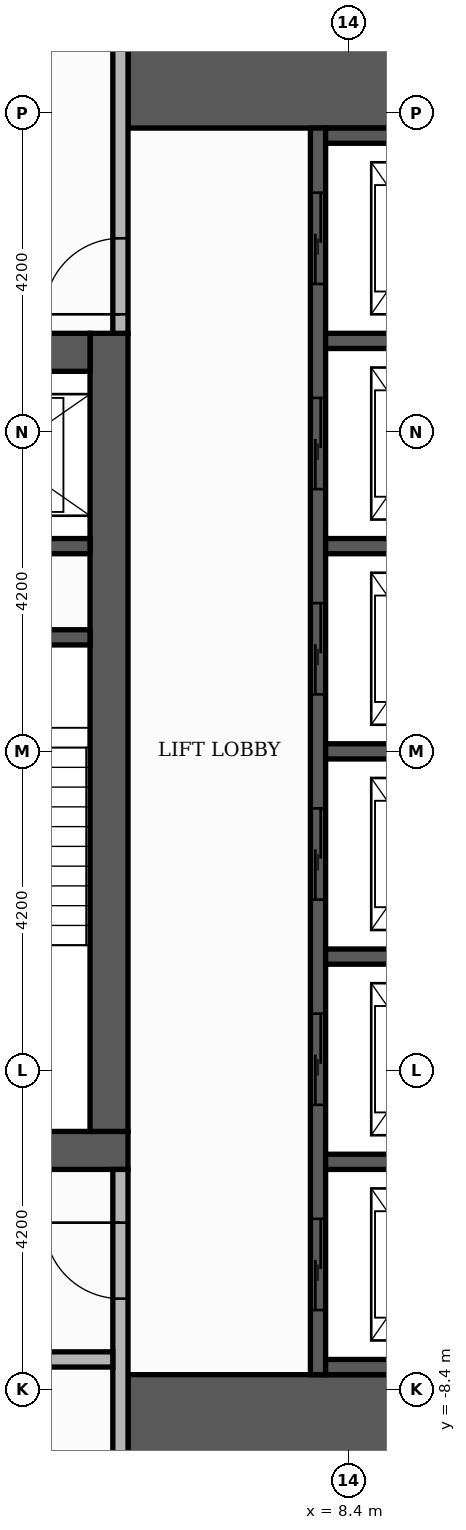
"""IFC4 building model, lengths in metres.
Left out: names, types, materials, properties, quantities, classifications, styles, units other than length and angle.
Written with IfcOpenShell. Run it as: python <this file> out.ifc"""

import sys

from ifc_helpers import new_model, si_unit, direction, frame, frame_2d, origin, place, context, subcontext, project, spatial, rectangle, extrude, element, fill, save


model = new_model("IFC4")
c1 = context("Model", 3, precision=1e-05, world=origin(), true_north=direction((0.0, 1.0)))
c2 = subcontext(c1, "Body", "Model", "MODEL_VIEW")
j1 = project(units=[si_unit("LENGTHUNIT", "METRE"), si_unit("PLANEANGLEUNIT", "RADIAN")], contexts=[c1])
p1 = place(None, origin())
s1 = spatial("IfcSite", under=j1, at=p1, CompositionType="ELEMENT")
p2 = place(p1, origin())
s2 = spatial("IfcBuilding", under=s1, at=p2, CompositionType="ELEMENT")
p3 = place(p2, frame((0.0, 0.0, 260.1)))
s3 = spatial("IfcBuildingStorey", under=s2, at=p3, CompositionType="ELEMENT", Elevation=260.1)
p4 = place(p3, frame((-5.5, -5.25, 0.0), z_axis=(0.0, 0.0, 1.0), x_axis=(1.0, 0.0, 0.0)))
e1 = element("IfcWall", 1, at=p4, inside=s3, PredefinedType="SHEAR", context=c2, shape_type="SweptSolid", body=[
    extrude(rectangle(XDim=11.0, YDim=0.5, at=frame_2d((5.5, 0.0))), origin(), (0.0, 0.0, 1.0), 3.48),
])
p5 = place(p4, frame((4.9, 0.0, 0.0)))
e2 = element("IfcOpeningElement", 2, at=p5, cuts=e1, PredefinedType="OPENING", context=c2, shape_type="SweptSolid", body=[
    extrude(rectangle(XDim=1.2, YDim=2.1, at=frame_2d((0.6, 1.05))), frame((0.0, 0.26, 0.0), z_axis=(0.0, -1.0, 0.0), x_axis=(1.0, 0.0, 0.0)), (0.0, 0.0, 1.0), 0.52),
])
p6 = place(p3, frame((5.25, -5.0, 0.0), z_axis=(0.0, 0.0, 1.0), x_axis=(0.0, 1.0, 0.0)))
e3 = element("IfcWall", 3, at=p6, inside=s3, PredefinedType="SHEAR", context=c2, shape_type="SweptSolid", body=[
    extrude(rectangle(XDim=10.5, YDim=0.5, at=frame_2d((5.25, 0.0))), origin(), (0.0, 0.0, 1.0), 3.48),
])
p7 = place(p3, frame((-5.0, 5.25, 0.0), z_axis=(0.0, 0.0, 1.0), x_axis=(1.0, 0.0, 0.0)))
e4 = element("IfcWall", 4, at=p7, inside=s3, PredefinedType="SHEAR", context=c2, shape_type="SweptSolid", body=[
    extrude(rectangle(XDim=10.0, YDim=0.5, at=frame_2d((5.0, 0.0))), origin(), (0.0, 0.0, 1.0), 3.48),
])
p8 = place(p7, frame((4.4, 0.0, 0.0)))
e5 = element("IfcOpeningElement", 5, at=p8, cuts=e4, PredefinedType="OPENING", context=c2, shape_type="SweptSolid", body=[
    extrude(rectangle(XDim=1.2, YDim=2.1, at=frame_2d((0.6, 1.05))), frame((0.0, 0.26, 0.0), z_axis=(0.0, -1.0, 0.0), x_axis=(1.0, 0.0, 0.0)), (0.0, 0.0, 1.0), 0.52),
])
for number, where, z_axis, x_axis in (
    (6, (5.5, -9.15, 0.0), (0.0, 0.0, 1.0), (1.0, 0.0, 0.0)),
    (7, (5.5, 9.15, 0.0), (0.0, 0.0, 1.0), (1.0, 0.0, 0.0)),
):
    element("IfcWall", number, at=place(p3, frame(where, z_axis=z_axis, x_axis=x_axis)), inside=s3, PredefinedType="SHEAR", context=c2, shape_type="SweptSolid", body=[
        extrude(rectangle(XDim=4.6, YDim=1.9, at=frame_2d((2.3, 0.0))), origin(), (0.0, 0.0, 1.0), 3.48),
    ])
p9 = place(p3, frame((2.15, 1.5, 0.0), z_axis=(0.0, 0.0, 1.0), x_axis=(1.0, 0.0, 0.0)))
e8 = element("IfcWall", 8, at=p9, inside=s3, PredefinedType="SHEAR", context=c2, shape_type="SweptSolid", body=[
    extrude(rectangle(XDim=2.85, YDim=0.2, at=frame_2d((1.425, 0.0))), origin(), (0.0, 0.0, 1.0), 3.48),
])
p10 = place(p3, frame((8.0, -8.2, 0.0), z_axis=(0.0, 0.0, 1.0), x_axis=(0.0, 1.0, 0.0)))
e9 = element("IfcWall", 9, at=p10, inside=s3, PredefinedType="SHEAR", context=c2, shape_type="SweptSolid", body=[
    extrude(rectangle(XDim=16.4, YDim=0.2, at=frame_2d((8.2, 0.0))), origin(), (0.0, 0.0, 1.0), 3.48),
])
p11 = place(p10, frame((0.85, 0.0, 0.0)))
e10 = element("IfcOpeningElement", 10, at=p11, cuts=e9, PredefinedType="OPENING", context=c2, shape_type="SweptSolid", body=[
    extrude(rectangle(XDim=1.2, YDim=2.1, at=frame_2d((0.6, 1.05))), frame((0.0, 0.11, 0.0), z_axis=(0.0, -1.0, 0.0), x_axis=(1.0, 0.0, 0.0)), (0.0, 0.0, 1.0), 0.22),
])
p12 = place(p10, frame((3.55, 0.0, 0.0)))
e11 = element("IfcOpeningElement", 11, at=p12, cuts=e9, PredefinedType="OPENING", context=c2, shape_type="SweptSolid", body=[
    extrude(rectangle(XDim=1.2, YDim=2.1, at=frame_2d((0.6, 1.05))), frame((0.0, 0.11, 0.0), z_axis=(0.0, -1.0, 0.0), x_axis=(1.0, 0.0, 0.0)), (0.0, 0.0, 1.0), 0.22),
])
p13 = place(p10, frame((6.25, 0.0, 0.0)))
e12 = element("IfcOpeningElement", 12, at=p13, cuts=e9, PredefinedType="OPENING", context=c2, shape_type="SweptSolid", body=[
    extrude(rectangle(XDim=1.2, YDim=2.1, at=frame_2d((0.6, 1.05))), frame((0.0, 0.11, 0.0), z_axis=(0.0, -1.0, 0.0), x_axis=(1.0, 0.0, 0.0)), (0.0, 0.0, 1.0), 0.22),
])
p14 = place(p10, frame((8.95, 0.0, 0.0)))
e13 = element("IfcOpeningElement", 13, at=p14, cuts=e9, PredefinedType="OPENING", context=c2, shape_type="SweptSolid", body=[
    extrude(rectangle(XDim=1.2, YDim=2.1, at=frame_2d((0.6, 1.05))), frame((0.0, 0.11, 0.0), z_axis=(0.0, -1.0, 0.0), x_axis=(1.0, 0.0, 0.0)), (0.0, 0.0, 1.0), 0.22),
])
p15 = place(p10, frame((11.65, 0.0, 0.0)))
e14 = element("IfcOpeningElement", 14, at=p15, cuts=e9, PredefinedType="OPENING", context=c2, shape_type="SweptSolid", body=[
    extrude(rectangle(XDim=1.2, YDim=2.1, at=frame_2d((0.6, 1.05))), frame((0.0, 0.11, 0.0), z_axis=(0.0, -1.0, 0.0), x_axis=(1.0, 0.0, 0.0)), (0.0, 0.0, 1.0), 0.22),
])
p16 = place(p10, frame((14.35, 0.0, 0.0)))
e15 = element("IfcOpeningElement", 15, at=p16, cuts=e9, PredefinedType="OPENING", context=c2, shape_type="SweptSolid", body=[
    extrude(rectangle(XDim=1.2, YDim=2.1, at=frame_2d((0.6, 1.05))), frame((0.0, 0.11, 0.0), z_axis=(0.0, -1.0, 0.0), x_axis=(1.0, 0.0, 0.0)), (0.0, 0.0, 1.0), 0.22),
])
for number, where, z_axis, x_axis in (
    (16, (8.1, -8.1, 0.0), (0.0, 0.0, 1.0), (1.0, 0.0, 0.0)),
    (17, (8.1, -5.4, 0.0), (0.0, 0.0, 1.0), (1.0, 0.0, 0.0)),
    (18, (8.1, -2.7, 0.0), (0.0, 0.0, 1.0), (1.0, 0.0, 0.0)),
    (19, (8.1, 0.0, 0.0), (0.0, 0.0, 1.0), (1.0, 0.0, 0.0)),
):
    element("IfcWall", number, at=place(p3, frame(where, z_axis=z_axis, x_axis=x_axis)), inside=s3, PredefinedType="SHEAR", context=c2, shape_type="SweptSolid", body=[
        extrude(rectangle(XDim=2.0, YDim=0.2, at=frame_2d((1.0, 0.0))), origin(), (0.0, 0.0, 1.0), 3.48),
    ])
p17 = place(p3, frame((2.15, 2.7, 0.0), z_axis=(0.0, 0.0, 1.0), x_axis=(1.0, 0.0, 0.0)))
e20 = element("IfcWall", 20, at=p17, inside=s3, PredefinedType="SHEAR", context=c2, shape_type="SweptSolid", body=[
    extrude(rectangle(XDim=2.85, YDim=0.2, at=frame_2d((1.425, 0.0))), origin(), (0.0, 0.0, 1.0), 3.48),
])
for number, where, z_axis, x_axis in (
    (21, (8.1, 2.7, 0.0), (0.0, 0.0, 1.0), (1.0, 0.0, 0.0)),
    (22, (8.1, 5.4, 0.0), (0.0, 0.0, 1.0), (1.0, 0.0, 0.0)),
    (23, (8.1, 8.1, 0.0), (0.0, 0.0, 1.0), (1.0, 0.0, 0.0)),
):
    element("IfcWall", number, at=place(p3, frame(where, z_axis=z_axis, x_axis=x_axis)), inside=s3, PredefinedType="SHEAR", context=c2, shape_type="SweptSolid", body=[
        extrude(rectangle(XDim=2.0, YDim=0.2, at=frame_2d((1.0, 0.0))), origin(), (0.0, 0.0, 1.0), 3.48),
    ])
p18 = place(p3, frame((5.4, -10.1, 0.0), z_axis=(0.0, 0.0, 1.0), x_axis=(0.0, 1.0, 0.0)))
e24 = element("IfcWall", 24, at=p18, inside=s3, PredefinedType="PARTITIONING", context=c2, shape_type="SweptSolid", body=[
    extrude(rectangle(XDim=4.6, YDim=0.2, at=frame_2d((2.3, 0.0))), origin(), (0.0, 0.0, 1.0), 3.48),
])
p19 = place(p18, frame((2.9, 0.0, 0.0)))
e25 = element("IfcOpeningElement", 25, at=p19, cuts=e24, PredefinedType="OPENING", context=c2, shape_type="SweptSolid", body=[
    extrude(rectangle(XDim=1.0, YDim=2.1, at=frame_2d((0.5, 1.05))), frame((0.0, 0.11, 0.0), z_axis=(0.0, -1.0, 0.0), x_axis=(1.0, 0.0, 0.0)), (0.0, 0.0, 1.0), 0.22),
])
p20 = place(p3, frame((2.35, -8.0, 0.0), z_axis=(0.0, 0.0, 1.0), x_axis=(1.0, 0.0, 0.0)))
e26 = element("IfcWall", 26, at=p20, inside=s3, PredefinedType="PARTITIONING", context=c2, shape_type="SweptSolid", body=[
    extrude(rectangle(XDim=2.95, YDim=0.2, at=frame_2d((1.475, 0.0))), origin(), (0.0, 0.0, 1.0), 3.48),
])
p21 = place(p20, frame((1.0, 0.0, 0.0)))
e27 = element("IfcOpeningElement", 27, at=p21, cuts=e26, PredefinedType="OPENING", context=c2, shape_type="SweptSolid", body=[
    extrude(rectangle(XDim=0.9, YDim=2.1, at=frame_2d((0.45, 1.05))), frame((0.0, 0.11, 0.0), z_axis=(0.0, -1.0, 0.0), x_axis=(1.0, 0.0, 0.0)), (0.0, 0.0, 1.0), 0.22),
])
p22 = place(p3, frame((5.4, 5.5, 0.0), z_axis=(0.0, 0.0, 1.0), x_axis=(0.0, 1.0, 0.0)))
e28 = element("IfcWall", 28, at=p22, inside=s3, PredefinedType="PARTITIONING", context=c2, shape_type="SweptSolid", body=[
    extrude(rectangle(XDim=4.6, YDim=0.2, at=frame_2d((2.3, 0.0))), origin(), (0.0, 0.0, 1.0), 3.48),
])
p23 = place(p22, frame((0.25, 0.0, 0.0)))
e29 = element("IfcOpeningElement", 29, at=p23, cuts=e28, PredefinedType="OPENING", context=c2, shape_type="SweptSolid", body=[
    extrude(rectangle(XDim=1.0, YDim=2.1, at=frame_2d((0.5, 1.05))), frame((0.0, 0.11, 0.0), z_axis=(0.0, -1.0, 0.0), x_axis=(1.0, 0.0, 0.0)), (0.0, 0.0, 1.0), 0.22),
])
p24 = place(p11, origin())
e30 = element("IfcDoor", 30, at=p24, inside=s3, OperationType="SLIDING_TO_LEFT", PredefinedType="DOOR", context=c2, shape_type="SweptSolid", body=[
    extrude(rectangle(XDim=1.2, YDim=2.1, at=frame_2d((0.6, 1.05))), frame((0.0, 0.025, 0.0), z_axis=(0.0, -1.0, 0.0), x_axis=(1.0, 0.0, 0.0)), (0.0, 0.0, 1.0), 0.05),
])
fill(e10, e30)
p25 = place(p12, origin())
e31 = element("IfcDoor", 31, at=p25, inside=s3, OperationType="SLIDING_TO_LEFT", PredefinedType="DOOR", context=c2, shape_type="SweptSolid", body=[
    extrude(rectangle(XDim=1.2, YDim=2.1, at=frame_2d((0.6, 1.05))), frame((0.0, 0.025, 0.0), z_axis=(0.0, -1.0, 0.0), x_axis=(1.0, 0.0, 0.0)), (0.0, 0.0, 1.0), 0.05),
])
fill(e11, e31)
p26 = place(p13, origin())
e32 = element("IfcDoor", 32, at=p26, inside=s3, OperationType="SLIDING_TO_LEFT", PredefinedType="DOOR", context=c2, shape_type="SweptSolid", body=[
    extrude(rectangle(XDim=1.2, YDim=2.1, at=frame_2d((0.6, 1.05))), frame((0.0, 0.025, 0.0), z_axis=(0.0, -1.0, 0.0), x_axis=(1.0, 0.0, 0.0)), (0.0, 0.0, 1.0), 0.05),
])
fill(e12, e32)
p27 = place(p14, origin())
e33 = element("IfcDoor", 33, at=p27, inside=s3, OperationType="SLIDING_TO_LEFT", PredefinedType="DOOR", context=c2, shape_type="SweptSolid", body=[
    extrude(rectangle(XDim=1.2, YDim=2.1, at=frame_2d((0.6, 1.05))), frame((0.0, 0.025, 0.0), z_axis=(0.0, -1.0, 0.0), x_axis=(1.0, 0.0, 0.0)), (0.0, 0.0, 1.0), 0.05),
])
fill(e13, e33)
p28 = place(p15, origin())
e34 = element("IfcDoor", 34, at=p28, inside=s3, OperationType="SLIDING_TO_LEFT", PredefinedType="DOOR", context=c2, shape_type="SweptSolid", body=[
    extrude(rectangle(XDim=1.2, YDim=2.1, at=frame_2d((0.6, 1.05))), frame((0.0, 0.025, 0.0), z_axis=(0.0, -1.0, 0.0), x_axis=(1.0, 0.0, 0.0)), (0.0, 0.0, 1.0), 0.05),
])
fill(e14, e34)
p29 = place(p16, origin())
e35 = element("IfcDoor", 35, at=p29, inside=s3, OperationType="SLIDING_TO_LEFT", PredefinedType="DOOR", context=c2, shape_type="SweptSolid", body=[
    extrude(rectangle(XDim=1.2, YDim=2.1, at=frame_2d((0.6, 1.05))), frame((0.0, 0.025, 0.0), z_axis=(0.0, -1.0, 0.0), x_axis=(1.0, 0.0, 0.0)), (0.0, 0.0, 1.0), 0.05),
])
fill(e15, e35)
p30 = place(p23, origin())
e36 = element("IfcDoor", 36, at=p30, inside=s3, OperationType="SINGLE_SWING_LEFT", PredefinedType="DOOR", context=c2, shape_type="SweptSolid", body=[
    extrude(rectangle(XDim=1.0, YDim=2.1, at=frame_2d((0.5, 1.05))), frame((0.0, 0.025, 0.0), z_axis=(0.0, -1.0, 0.0), x_axis=(1.0, 0.0, 0.0)), (0.0, 0.0, 1.0), 0.05),
])
fill(e29, e36)
p31 = place(p19, origin())
e37 = element("IfcDoor", 37, at=p31, inside=s3, OperationType="SINGLE_SWING_RIGHT", PredefinedType="DOOR", context=c2, shape_type="SweptSolid", body=[
    extrude(rectangle(XDim=1.0, YDim=2.1, at=frame_2d((0.5, 1.05))), frame((0.0, 0.025, 0.0), z_axis=(0.0, -1.0, 0.0), x_axis=(1.0, 0.0, 0.0)), (0.0, 0.0, 1.0), 0.05),
])
fill(e25, e37)
save(model, sys.argv[1])
